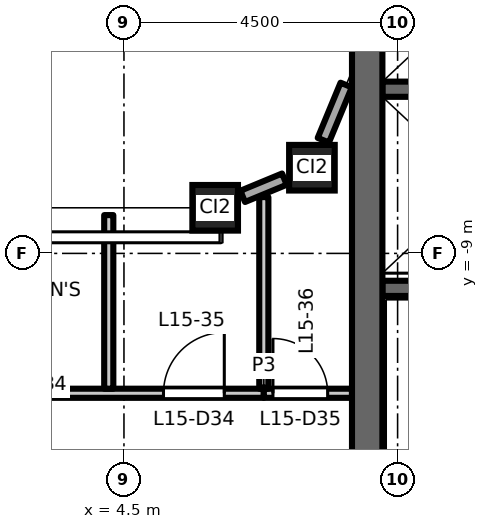
"""IFC4 building model, lengths in metres.
Left out: names, types, materials, properties, quantities, classifications, styles, units other than length and angle.
Written with IfcOpenShell. Run it as: python <this file> out.ifc"""

import sys

from ifc_helpers import new_model, si_unit, direction, frame, frame_2d, origin, origin_2d, place, context, subcontext, project, spatial, rectangle, hollow_rectangle, extrude, element, fill, save


model = new_model("IFC4")
c1 = context("Model", 3, precision=1e-05, world=origin(), true_north=direction((0.0, 1.0)))
c2 = subcontext(c1, "Body", "Model", "MODEL_VIEW")
j1 = project(units=[si_unit("LENGTHUNIT", "METRE"), si_unit("PLANEANGLEUNIT", "RADIAN")], contexts=[c1])
p1 = place(None, origin())
s1 = spatial("IfcSite", under=j1, at=p1, CompositionType="ELEMENT")
p2 = place(p1, origin())
s2 = spatial("IfcBuilding", under=s1, at=p2, CompositionType="ELEMENT")
p3 = place(p2, frame((0.0, 0.0, 71.7)))
s3 = spatial("IfcBuildingStorey", under=s2, at=p3, CompositionType="ELEMENT", Elevation=71.7)
for number, where, z_axis, x_axis in (
    (1, (6.0, -8.25, 0.0), (0.0, 0.0, 1.0), (1.0, 0.0, 0.0)),
    (2, (7.591, -7.591, 0.0), (0.0, 0.0, 1.0), (1.0, 0.0, 0.0)),
):
    element("IfcColumn", number, at=place(p3, frame(where, z_axis=z_axis, x_axis=x_axis)), inside=s3, PredefinedType="COLUMN", context=c2, shape_type="SweptSolid", body=[
        extrude(hollow_rectangle(XDim=0.75, YDim=0.75, WallThickness=0.045, at=origin_2d()), origin(), (0.0, 0.0, 1.0), 4.5),
    ])
p4 = place(p3, frame((8.75, -6.3, 0.0), z_axis=(0.0, 0.0, 1.0), x_axis=(1.0, 0.0, 0.0)))
e3 = element("IfcWall", 3, at=p4, inside=s3, PredefinedType="SHEAR", context=c2, shape_type="SweptSolid", body=[
    extrude(rectangle(XDim=3.1, YDim=0.25, at=frame_2d((1.55, 0.0))), origin(), (0.0, 0.0, 1.0), 4.35),
])
p5 = place(p3, frame((8.75, -9.575, 0.0), z_axis=(0.0, 0.0, 1.0), x_axis=(1.0, 0.0, 0.0)))
e4 = element("IfcWall", 4, at=p5, inside=s3, PredefinedType="SHEAR", context=c2, shape_type="SweptSolid", body=[
    extrude(rectangle(XDim=8.0, YDim=0.25, at=frame_2d((4.0, 0.0))), origin(), (0.0, 0.0, 1.0), 4.35),
])
p6 = place(p5, frame((6.65, 0.0, 0.0)))
e5 = element("IfcOpeningElement", 5, at=p6, cuts=e4, PredefinedType="OPENING", context=c2, shape_type="SweptSolid", body=[
    extrude(rectangle(XDim=1.1, YDim=2.1, at=frame_2d((0.55, 1.05))), frame((0.0, 0.135, 0.0), z_axis=(0.0, -1.0, 0.0), x_axis=(1.0, 0.0, 0.0)), (0.0, 0.0, 1.0), 0.27),
])
p7 = place(p3, frame((8.5, -13.0, 0.0), z_axis=(0.0, 0.0, 1.0), x_axis=(0.0, 1.0, 0.0)))
e6 = element("IfcWall", 6, at=p7, inside=s3, PredefinedType="SHEAR", context=c2, shape_type="SweptSolid", body=[
    extrude(rectangle(XDim=26.0, YDim=0.5, at=frame_2d((13.0, 0.0))), origin(), (0.0, 0.0, 1.0), 4.35),
])
p8 = place(p3, frame((6.453, -8.062, 0.0), z_axis=(0.0, 0.0, 1.0), x_axis=(0.923940677943, 0.382535780864, 0.0)))
e7 = element("IfcWall", 7, at=p8, inside=s3, PredefinedType="STANDARD", context=c2, shape_type="SweptSolid", body=[
    extrude(rectangle(XDim=0.742, YDim=0.2, at=frame_2d((0.371, 0.0))), origin(), (0.0, 0.0, 1.0), 3.73),
])
p9 = place(p3, frame((7.779, -7.138, 0.0), z_axis=(0.0, 0.0, 1.0), x_axis=(0.382549378284, 0.923935048136, 0.0)))
e8 = element("IfcWall", 8, at=p9, inside=s3, PredefinedType="STANDARD", context=c2, shape_type="SweptSolid", body=[
    extrude(rectangle(XDim=0.982, YDim=0.2, at=frame_2d((0.491, 0.0))), origin(), (0.0, 0.0, 1.0), 3.73),
])
p10 = place(p3, frame((-8.25, -11.3, 0.0), z_axis=(0.0, 0.0, 1.0), x_axis=(1.0, 0.0, 0.0)))
e9 = element("IfcWall", 9, at=p10, inside=s3, PredefinedType="PARTITIONING", context=c2, shape_type="SweptSolid", body=[
    extrude(rectangle(XDim=15.05, YDim=0.15, at=frame_2d((7.525, 0.0))), origin(), (0.0, 0.0, 1.0), 4.35),
])
p11 = place(p10, frame((2.6, 0.0, 0.0)))
e10 = element("IfcOpeningElement", 10, at=p11, cuts=e9, PredefinedType="OPENING", context=c2, shape_type="SweptSolid", body=[
    extrude(rectangle(XDim=1.0, YDim=2.1, at=frame_2d((0.5, 1.05))), frame((0.0, 0.085, 0.0), z_axis=(0.0, -1.0, 0.0), x_axis=(1.0, 0.0, 0.0)), (0.0, 0.0, 1.0), 0.17),
])
p12 = place(p10, frame((8.85, 0.0, 0.0)))
e11 = element("IfcOpeningElement", 11, at=p12, cuts=e9, PredefinedType="OPENING", context=c2, shape_type="SweptSolid", body=[
    extrude(rectangle(XDim=1.0, YDim=2.1, at=frame_2d((0.5, 1.05))), frame((0.0, 0.085, 0.0), z_axis=(0.0, -1.0, 0.0), x_axis=(1.0, 0.0, 0.0)), (0.0, 0.0, 1.0), 0.17),
])
p13 = place(p10, frame((13.4, 0.0, 0.0)))
e12 = element("IfcOpeningElement", 12, at=p13, cuts=e9, PredefinedType="OPENING", context=c2, shape_type="SweptSolid", body=[
    extrude(rectangle(XDim=1.0, YDim=2.1, at=frame_2d((0.5, 1.05))), frame((0.0, 0.085, 0.0), z_axis=(0.0, -1.0, 0.0), x_axis=(1.0, 0.0, 0.0)), (0.0, 0.0, 1.0), 0.17),
])
p14 = place(p3, frame((6.8, -11.3, 0.0), z_axis=(0.0, 0.0, 1.0), x_axis=(1.0, 0.0, 0.0)))
e13 = element("IfcWall", 13, at=p14, inside=s3, PredefinedType="PARTITIONING", context=c2, shape_type="SweptSolid", body=[
    extrude(rectangle(XDim=1.45, YDim=0.15, at=frame_2d((0.725, 0.0))), origin(), (0.0, 0.0, 1.0), 4.35),
])
p15 = place(p14, frame((0.15, 0.0, 0.0)))
e14 = element("IfcOpeningElement", 14, at=p15, cuts=e13, PredefinedType="OPENING", context=c2, shape_type="SweptSolid", body=[
    extrude(rectangle(XDim=0.9, YDim=2.1, at=frame_2d((0.45, 1.05))), frame((0.0, 0.085, 0.0), z_axis=(0.0, -1.0, 0.0), x_axis=(1.0, 0.0, 0.0)), (0.0, 0.0, 1.0), 0.17),
])
p16 = place(p3, frame((4.25, -11.225, 0.0), z_axis=(0.0, 0.0, 1.0), x_axis=(0.0, 1.0, 0.0)))
e15 = element("IfcWall", 15, at=p16, inside=s3, PredefinedType="PARTITIONING", context=c2, shape_type="SweptSolid", body=[
    extrude(rectangle(XDim=2.855, YDim=0.15, at=frame_2d((1.427, 0.0))), origin(), (0.0, 0.0, 1.0), 4.35),
])
p17 = place(p3, frame((6.8, -11.225, 0.0), z_axis=(0.0, 0.0, 1.0), x_axis=(0.0, 1.0, 0.0)))
e16 = element("IfcWall", 16, at=p17, inside=s3, PredefinedType="PARTITIONING", context=c2, shape_type="SweptSolid", body=[
    extrude(rectangle(XDim=3.151, YDim=0.15, at=frame_2d((1.576, 0.0))), origin(), (0.0, 0.0, 1.0), 4.35),
])
p18 = place(p13, origin())
e17 = element("IfcDoor", 17, at=p18, inside=s3, OperationType="SINGLE_SWING_RIGHT", PredefinedType="DOOR", context=c2, shape_type="SweptSolid", body=[
    extrude(rectangle(XDim=1.0, YDim=2.1, at=frame_2d((0.5, 1.05))), frame((0.0, 0.025, 0.0), z_axis=(0.0, -1.0, 0.0), x_axis=(1.0, 0.0, 0.0)), (0.0, 0.0, 1.0), 0.05),
])
fill(e12, e17)
p19 = place(p15, origin())
e18 = element("IfcDoor", 18, at=p19, inside=s3, OperationType="SINGLE_SWING_LEFT", PredefinedType="DOOR", context=c2, shape_type="SweptSolid", body=[
    extrude(rectangle(XDim=0.9, YDim=2.1, at=frame_2d((0.45, 1.05))), frame((0.0, 0.025, 0.0), z_axis=(0.0, -1.0, 0.0), x_axis=(1.0, 0.0, 0.0)), (0.0, 0.0, 1.0), 0.05),
])
fill(e14, e18)
save(model, sys.argv[1])
